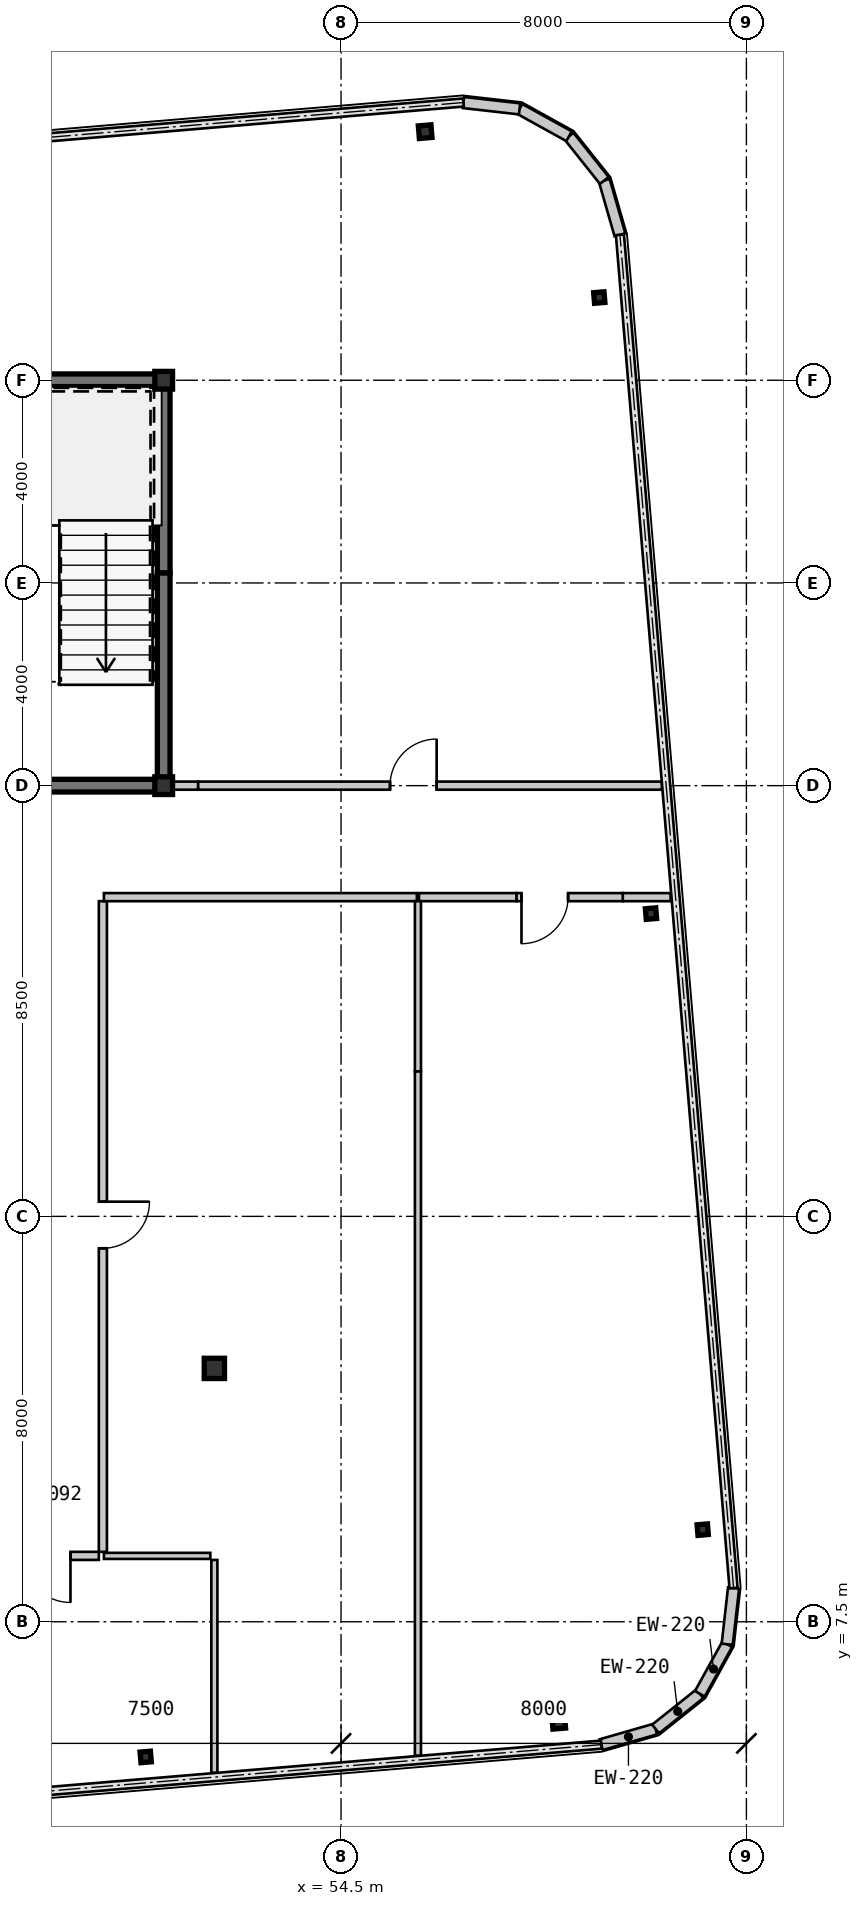
"""IFC4 building model, lengths in metres.
Left out: names, types, materials, properties, quantities, classifications, styles, units other than length and angle.
Written with IfcOpenShell. Run it as: python <this file> out.ifc"""

import sys

from ifc_helpers import new_model, si_unit, direction, frame, frame_2d, origin, origin_2d, place, context, subcontext, project, spatial, rectangle, hollow_rectangle, i_section, extrude, source, transform, mapped, element, fill, save


model = new_model("IFC4")
c1 = context("Model", 3, precision=1e-05, world=origin(), true_north=direction((0.0, 1.0)))
c2 = subcontext(c1, "Body", "Model", "MODEL_VIEW")
j1 = project(units=[si_unit("LENGTHUNIT", "METRE"), si_unit("PLANEANGLEUNIT", "RADIAN")], contexts=[c1])
p1 = place(None, origin())
s1 = spatial("IfcSite", under=j1, at=p1, CompositionType="ELEMENT")
p2 = place(p1, origin())
s2 = spatial("IfcBuilding", under=s1, at=p2, CompositionType="ELEMENT")
p3 = place(p2, frame((0.0, 0.0, 191.45)))
s3 = spatial("IfcBuildingStorey", under=s2, at=p3, CompositionType="ELEMENT", Elevation=191.45)
m1 = source(origin(), c2, "Body", "SweptSolid", [
    extrude(hollow_rectangle(XDim=0.35, YDim=0.35, WallThickness=0.016, at=origin_2d()), origin(), (0.0, 0.0, 1.0), 3.15),
])
for number, where, z_axis, x_axis in (
    (1, (51.0, 24.0, 0.0), (0.0, 0.0, 1.0), (1.0, 0.0, 0.0)),
    (2, (51.0, 32.0, 0.0), (0.0, 0.0, 1.0), (1.0, 0.0, 0.0)),
):
    element("IfcColumn", number, at=place(p3, frame(where, z_axis=z_axis, x_axis=x_axis)), inside=s3, PredefinedType="COLUMN", context=c2, shape_type="MappedRepresentation", body=[
        mapped(m1, transform((0.0, 0.0, 0.0), scale=1.0)),
    ])
m2 = source(origin(), c2, "Body", "SweptSolid", [
    extrude(hollow_rectangle(XDim=0.4, YDim=0.4, WallThickness=0.016, at=origin_2d()), origin(), (0.0, 0.0, 1.0), 3.15),
])
p4 = place(p3, frame((52.0, 12.5, 0.0), z_axis=(0.0, 0.0, 1.0), x_axis=(1.0, 0.0, 0.0)))
e3 = element("IfcColumn", 3, at=p4, inside=s3, PredefinedType="COLUMN", context=c2, shape_type="MappedRepresentation", body=[
    mapped(m2, transform((0.0, 0.0, 0.0), scale=1.0)),
])
m3 = source(origin(), c2, "Body", "SweptSolid", [
    extrude(i_section(OverallWidth=0.205, OverallDepth=0.21, WebThickness=0.009, FlangeThickness=0.014, at=origin_2d()), origin(), (0.0, 0.0, 1.0), 3.15),
])
p5 = place(p3, frame((50.645, 4.832, 0.0), z_axis=(0.0, 0.0, 1.0), x_axis=(0.99649285925, 0.083677843332, 0.0)))
e4 = element("IfcColumn", 4, at=p5, inside=s3, PredefinedType="COLUMN", context=c2, shape_type="MappedRepresentation", body=[
    mapped(m3, transform((0.0, 0.0, 0.0), scale=1.0)),
])
m4 = source(origin(), c2, "Body", "SweptSolid", [
    extrude(hollow_rectangle(XDim=0.25, YDim=0.25, WallThickness=0.01, at=origin_2d()), origin(), (0.0, 0.0, 1.0), 3.15),
])
for number, where, z_axis, x_axis in (
    (5, (58.796, 5.516, 0.0), (0.0, 0.0, 1.0), (0.996, 0.084, 0.0)),
    (6, (56.16, 36.906, 0.0), (0.0, 0.0, 1.0), (0.996, 0.084, 0.0)),
):
    element("IfcColumn", number, at=place(p3, frame(where, z_axis=z_axis, x_axis=x_axis)), inside=s3, PredefinedType="COLUMN", context=c2, shape_type="MappedRepresentation", body=[
        mapped(m4, transform((0.0, 0.0, 0.0), scale=1.0)),
    ])
for number, where, z_axis, x_axis in (
    (7, (61.638, 9.318, 0.0), (0.0, 0.0, 1.0), (0.996, 0.084, 0.0)),
    (8, (60.617, 21.475, 0.0), (0.0, 0.0, 1.0), (0.996, 0.084, 0.0)),
    (9, (59.596, 33.632, 0.0), (0.0, 0.0, 1.0), (0.996, 0.084, 0.0)),
):
    element("IfcColumn", number, at=place(p3, frame(where, z_axis=z_axis, x_axis=x_axis)), inside=s3, PredefinedType="COLUMN", context=c2, shape_type="MappedRepresentation", body=[
        mapped(m3, transform((0.0, 0.0, 0.0), scale=1.0)),
    ])
m5 = source(origin(), c2, "Body", "SweptSolid", [
    extrude(rectangle(XDim=1.116, YDim=0.22, at=frame_2d((0.558, 0.0))), origin(), (0.0, 0.0, 1.0), 2.93),
])
for number, where, z_axis, x_axis in (
    (10, (59.636, 5.075, 0.0), (0.0, 0.0, 1.0), (0.961, 0.277, 0.0)),
    (11, (60.708, 5.384, 0.0), (0.0, 0.0, 1.0), (0.782, 0.623, 0.0)),
    (12, (61.581, 6.079, 0.0), (0.0, 0.0, 1.0), (0.484, 0.875, 0.0)),
    (13, (62.121, 7.056, 0.0), (0.0, 0.0, 1.0), (0.112, 0.994, 0.0)),
    (14, (60.004, 34.87, 0.0), (0.0, 0.0, 1.0), (-0.277, 0.961, 0.0)),
    (15, (59.696, 35.943, 0.0), (0.0, 0.0, 1.0), (-0.623, 0.782, 0.0)),
    (16, (59.0, 36.816, 0.0), (0.0, 0.0, 1.0), (-0.875, 0.484, 0.0)),
    (17, (58.024, 37.356, 0.0), (0.0, 0.0, 1.0), (-0.994, 0.112, 0.0)),
):
    element("IfcWall", number, at=place(p3, frame(where, z_axis=z_axis, x_axis=x_axis)), inside=s3, PredefinedType="SOLIDWALL", context=c2, shape_type="MappedRepresentation", body=[
        mapped(m5, transform((0.0, 0.0, 0.0), scale=1.0)),
    ])
m6 = source(origin(), c2, "Body", "SweptSolid", [
    extrude(rectangle(XDim=11.925, YDim=0.25, at=frame_2d((5.962, 0.0))), origin(), (0.0, 0.0, 1.0), 2.93),
])
p6 = place(p3, frame((39.2, 32.0, 0.0), z_axis=(0.0, 0.0, 1.0), x_axis=(1.0, 0.0, 0.0)))
e18 = element("IfcWall", 18, at=p6, inside=s3, PredefinedType="SHEAR", context=c2, shape_type="MappedRepresentation", body=[
    mapped(m6, transform((0.0, 0.0, 0.0), scale=1.0)),
])
m7 = source(origin(), c2, "Body", "SweptSolid", [
    extrude(rectangle(XDim=4.075, YDim=0.25, at=frame_2d((2.038, 0.0))), origin(), (0.0, 0.0, 1.0), 2.93),
])
p7 = place(p3, frame((51.0, 24.125, 0.0), z_axis=(0.0, 0.0, 1.0), x_axis=(0.0, 1.0, 0.0)))
e19 = element("IfcWall", 19, at=p7, inside=s3, PredefinedType="SHEAR", context=c2, shape_type="MappedRepresentation", body=[
    mapped(m7, transform((0.0, 0.0, 0.0), scale=1.0)),
])
m8 = source(origin(), c2, "Body", "SweptSolid", [
    extrude(rectangle(XDim=3.675, YDim=0.25, at=frame_2d((1.837, 0.0))), origin(), (0.0, 0.0, 1.0), 2.93),
])
p8 = place(p3, frame((51.0, 28.2, 0.0), z_axis=(0.0, 0.0, 1.0), x_axis=(0.0, 1.0, 0.0)))
e20 = element("IfcWall", 20, at=p8, inside=s3, PredefinedType="SHEAR", context=c2, shape_type="MappedRepresentation", body=[
    mapped(m8, transform((0.0, 0.0, 0.0), scale=1.0)),
])
m9 = source(origin(), c2, "Body", "SweptSolid", [
    extrude(rectangle(XDim=4.85, YDim=0.25, at=frame_2d((2.425, 0.0))), origin(), (0.0, 0.0, 1.0), 2.93),
])
p9 = place(p3, frame((46.275, 24.0, 0.0), z_axis=(0.0, 0.0, 1.0), x_axis=(1.0, 0.0, 0.0)))
e21 = element("IfcWall", 21, at=p9, inside=s3, PredefinedType="SHEAR", context=c2, shape_type="MappedRepresentation", body=[
    mapped(m9, transform((0.0, 0.0, 0.0), scale=1.0)),
])
m10 = source(origin(), c2, "Body", "SweptSolid", [
    extrude(rectangle(XDim=2.04, YDim=0.16, at=frame_2d((1.02, 0.0))), origin(), (0.0, 0.0, 1.0), 2.93),
])
p10 = place(p3, frame((49.72, 8.8, 0.0), z_axis=(0.0, 0.0, 1.0), x_axis=(-1.0, 0.0, 0.0)))
e22 = element("IfcWall", 22, at=p10, inside=s3, PredefinedType="PARTITIONING", context=c2, shape_type="MappedRepresentation", body=[
    mapped(m10, transform((0.0, 0.0, 0.0), scale=1.0)),
])
m11 = source(origin(), c2, "Body", "SweptSolid", [
    extrude(rectangle(XDim=0.92, YDim=2.1, at=frame_2d((0.46, 1.05))), frame((0.0, 0.09, 0.0), z_axis=(0.0, -1.0, 0.0), x_axis=(1.0, 0.0, 0.0)), (0.0, 0.0, 1.0), 0.18),
])
p11 = place(p10, frame((0.56, 0.0, 0.0)))
e23 = element("IfcOpeningElement", 23, at=p11, cuts=e22, PredefinedType="OPENING", context=c2, shape_type="MappedRepresentation", body=[
    mapped(m11, transform((0.0, 0.0, 0.0), scale=1.0)),
])
m12 = source(origin(), c2, "Body", "SweptSolid", [
    extrude(rectangle(XDim=0.556, YDim=0.16, at=frame_2d((0.278, 0.0))), origin(), (0.0, 0.0, 1.0), 2.47),
])
p12 = place(p3, frame((51.125, 24.0, 0.0), z_axis=(0.0, 0.0, 1.0), x_axis=(1.0, 0.0, 0.0)))
e24 = element("IfcWall", 24, at=p12, inside=s3, PredefinedType="PARTITIONING", context=c2, shape_type="MappedRepresentation", body=[
    mapped(m12, transform((0.0, 0.0, 0.0), scale=1.0)),
])
m13 = source(origin(), c2, "Body", "SweptSolid", [
    extrude(rectangle(XDim=9.153, YDim=0.16, at=frame_2d((4.576, 0.0))), origin(), (0.0, 0.0, 1.0), 2.93),
])
p13 = place(p3, frame((51.681, 24.0, 0.0), z_axis=(0.0, 0.0, 1.0), x_axis=(1.0, 0.0, 0.0)))
e25 = element("IfcWall", 25, at=p13, inside=s3, PredefinedType="PARTITIONING", context=c2, shape_type="MappedRepresentation", body=[
    mapped(m13, transform((0.0, 0.0, 0.0), scale=1.0)),
])
p14 = place(p13, frame((3.786, 0.0, 0.0)))
e26 = element("IfcOpeningElement", 26, at=p14, cuts=e25, PredefinedType="OPENING", context=c2, shape_type="MappedRepresentation", body=[
    mapped(m11, transform((0.0, 0.0, 0.0), scale=1.0)),
])
m14 = source(origin(), c2, "Body", "SweptSolid", [
    extrude(rectangle(XDim=12.84, YDim=0.16, at=frame_2d((6.42, 0.0))), origin(), (0.0, 0.0, 1.0), 2.93),
])
p15 = place(p3, frame((49.8, 21.72, 0.0), z_axis=(0.0, 0.0, 1.0), x_axis=(0.0, -1.0, 0.0)))
e27 = element("IfcWall", 27, at=p15, inside=s3, PredefinedType="PARTITIONING", context=c2, shape_type="MappedRepresentation", body=[
    mapped(m14, transform((0.0, 0.0, 0.0), scale=1.0)),
])
p16 = place(p15, frame((5.93, 0.0, 0.0)))
e28 = element("IfcOpeningElement", 28, at=p16, cuts=e27, PredefinedType="OPENING", context=c2, shape_type="MappedRepresentation", body=[
    mapped(m11, transform((0.0, 0.0, 0.0), scale=1.0)),
])
m15 = source(origin(), c2, "Body", "SweptSolid", [
    extrude(rectangle(XDim=6.177, YDim=0.16, at=frame_2d((3.088, 0.0))), origin(), (0.0, 0.0, 1.0), 2.93),
])
p17 = place(p3, frame((55.997, 21.8, 0.0), z_axis=(0.0, 0.0, 1.0), x_axis=(-1.0, 0.0, 0.0)))
e29 = element("IfcWall", 29, at=p17, inside=s3, PredefinedType="PARTITIONING", context=c2, shape_type="MappedRepresentation", body=[
    mapped(m15, transform((0.0, 0.0, 0.0), scale=1.0)),
])
m16 = source(origin(), c2, "Body", "SweptSolid", [
    extrude(rectangle(XDim=0.945, YDim=0.16, at=frame_2d((0.473, 0.0))), origin(), (0.0, 0.0, 1.0), 2.93),
])
p18 = place(p3, frame((61.005, 21.8, 0.0), z_axis=(0.0, 0.0, 1.0), x_axis=(-1.0, 0.0, 0.0)))
e30 = element("IfcWall", 30, at=p18, inside=s3, PredefinedType="PARTITIONING", context=c2, shape_type="MappedRepresentation", body=[
    mapped(m16, transform((0.0, 0.0, 0.0), scale=1.0)),
])
m17 = source(origin(), c2, "Body", "SweptSolid", [
    extrude(rectangle(XDim=2.098, YDim=0.16, at=frame_2d((1.049, 0.0))), origin(), (0.0, 0.0, 1.0), 2.47),
])
p19 = place(p3, frame((60.059, 21.8, 0.0), z_axis=(0.0, 0.0, 1.0), x_axis=(-1.0, 0.0, 0.0)))
e31 = element("IfcWall", 31, at=p19, inside=s3, PredefinedType="PARTITIONING", context=c2, shape_type="MappedRepresentation", body=[
    mapped(m17, transform((0.0, 0.0, 0.0), scale=1.0)),
])
p20 = place(p19, frame((1.078, 0.0, 0.0)))
e32 = element("IfcOpeningElement", 32, at=p20, cuts=e31, PredefinedType="OPENING", context=c2, shape_type="MappedRepresentation", body=[
    mapped(m11, transform((0.0, 0.0, 0.0), scale=1.0)),
])
m18 = source(origin(), c2, "Body", "SweptSolid", [
    extrude(rectangle(XDim=1.924, YDim=0.16, at=frame_2d((0.962, 0.0))), origin(), (0.0, 0.0, 1.0), 2.93),
])
p21 = place(p3, frame((57.961, 21.8, 0.0), z_axis=(0.0, 0.0, 1.0), x_axis=(-1.0, 0.0, 0.0)))
e33 = element("IfcWall", 33, at=p21, inside=s3, PredefinedType="PARTITIONING", context=c2, shape_type="MappedRepresentation", body=[
    mapped(m18, transform((0.0, 0.0, 0.0), scale=1.0)),
])
m19 = source(origin(), c2, "Body", "SweptSolid", [
    extrude(rectangle(XDim=4.202, YDim=0.12, at=frame_2d((2.101, 0.0))), origin(), (0.0, 0.0, 1.0), 2.93),
])
p22 = place(p3, frame((52.0, 8.72, 0.0), z_axis=(0.0, 0.0, 1.0), x_axis=(0.0, -1.0, 0.0)))
e34 = element("IfcWall", 34, at=p22, inside=s3, PredefinedType="PARTITIONING", context=c2, shape_type="MappedRepresentation", body=[
    mapped(m19, transform((0.0, 0.0, 0.0), scale=1.0)),
])
m20 = source(origin(), c2, "Body", "SweptSolid", [
    extrude(rectangle(XDim=2.1, YDim=0.12, at=frame_2d((1.05, 0.0))), origin(), (0.0, 0.0, 1.0), 2.93),
])
p23 = place(p3, frame((49.82, 8.8, 0.0), z_axis=(0.0, 0.0, 1.0), x_axis=(1.0, 0.0, 0.0)))
e35 = element("IfcWall", 35, at=p23, inside=s3, PredefinedType="PARTITIONING", context=c2, shape_type="MappedRepresentation", body=[
    mapped(m20, transform((0.0, 0.0, 0.0), scale=1.0)),
])
m21 = source(origin(), c2, "Body", "SweptSolid", [
    extrude(rectangle(XDim=3.359, YDim=0.12, at=frame_2d((1.68, 0.0))), origin(), (0.0, 0.0, 1.0), 2.397),
])
p24 = place(p3, frame((56.018, 21.72, 0.0), z_axis=(0.0, 0.0, 1.0), x_axis=(0.0, -1.0, 0.0)))
e36 = element("IfcWall", 36, at=p24, inside=s3, PredefinedType="PARTITIONING", context=c2, shape_type="MappedRepresentation", body=[
    mapped(m21, transform((0.0, 0.0, 0.0), scale=1.0)),
])
m22 = source(origin(), c2, "Body", "SweptSolid", [
    extrude(rectangle(XDim=13.506, YDim=0.12, at=frame_2d((6.753, 0.0))), origin(), (0.0, 0.0, 1.0), 2.93),
])
p25 = place(p3, frame((56.018, 18.361, 0.0), z_axis=(0.0, 0.0, 1.0), x_axis=(0.0, -1.0, 0.0)))
e37 = element("IfcWall", 37, at=p25, inside=s3, PredefinedType="PARTITIONING", context=c2, shape_type="MappedRepresentation", body=[
    mapped(m22, transform((0.0, 0.0, 0.0), scale=1.0)),
])
m23 = source(origin(), c2, "Body", "SweptSolid", [
    extrude(rectangle(XDim=0.92, YDim=2.1, at=frame_2d((0.46, 1.05))), frame((0.0, 0.025, 0.0), z_axis=(0.0, -1.0, 0.0), x_axis=(1.0, 0.0, 0.0)), (0.0, 0.0, 1.0), 0.05),
])
p26 = place(p11, origin())
e38 = element("IfcDoor", 38, at=p26, inside=s3, OperationType="SINGLE_SWING_LEFT", PredefinedType="DOOR", context=c2, shape_type="MappedRepresentation", body=[
    mapped(m23, transform((0.0, 0.0, 0.0), scale=1.0)),
])
fill(e23, e38)
p27 = place(p14, origin())
e39 = element("IfcDoor", 39, at=p27, inside=s3, OperationType="SINGLE_SWING_RIGHT", PredefinedType="DOOR", context=c2, shape_type="MappedRepresentation", body=[
    mapped(m23, transform((0.0, 0.0, 0.0), scale=1.0)),
])
fill(e26, e39)
p28 = place(p16, origin())
e40 = element("IfcDoor", 40, at=p28, inside=s3, OperationType="SINGLE_SWING_LEFT", PredefinedType="DOOR", context=c2, shape_type="MappedRepresentation", body=[
    mapped(m23, transform((0.0, 0.0, 0.0), scale=1.0)),
])
fill(e28, e40)
p29 = place(p20, origin())
e41 = element("IfcDoor", 41, at=p29, inside=s3, OperationType="SINGLE_SWING_RIGHT", PredefinedType="DOOR", context=c2, shape_type="MappedRepresentation", body=[
    mapped(m23, transform((0.0, 0.0, 0.0), scale=1.0)),
])
fill(e32, e41)
save(model, sys.argv[1])
